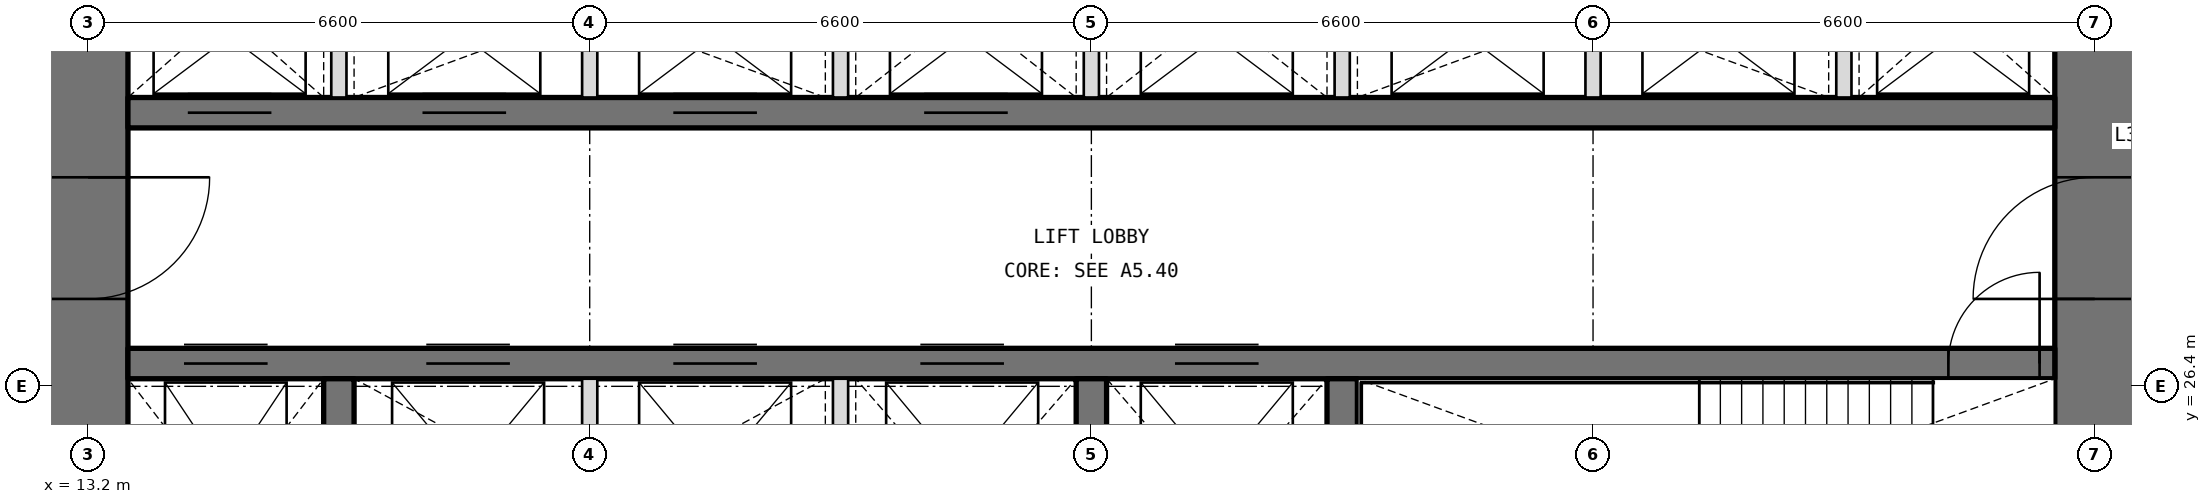
"""IFC4 building model, lengths in metres.
Left out: names, types, materials, properties, quantities, classifications, styles, units other than length and angle.
Written with IfcOpenShell. Run it as: python <this file> out.ifc"""

import sys

from ifc_helpers import new_model, si_unit, direction, frame, frame_2d, origin, place, context, subcontext, project, spatial, rectangle, extrude, element, fill, save


model = new_model("IFC4")
c1 = context("Model", 3, precision=1e-05, world=origin(), true_north=direction((0.0, 1.0)))
c2 = subcontext(c1, "Body", "Model", "MODEL_VIEW")
j1 = project(units=[si_unit("LENGTHUNIT", "METRE"), si_unit("PLANEANGLEUNIT", "RADIAN")], contexts=[c1])
p1 = place(None, origin())
s1 = spatial("IfcSite", under=j1, at=p1, CompositionType="ELEMENT")
p2 = place(p1, origin())
s2 = spatial("IfcBuilding", under=s1, at=p2, CompositionType="ELEMENT")
p3 = place(p2, frame((0.0, 0.0, 168.3)))
s3 = spatial("IfcBuildingStorey", under=s2, at=p3, CompositionType="ELEMENT", Elevation=168.3)
p4 = place(p3, frame((39.6, 13.725, 0.0), z_axis=(0.0, 0.0, 1.0), x_axis=(0.0, 1.0, 0.0)))
e1 = element("IfcWall", 1, at=p4, inside=s3, PredefinedType="SHEAR", context=c2, shape_type="SweptSolid", body=[
    extrude(rectangle(XDim=18.75, YDim=1.05, at=frame_2d((9.375, 0.0))), origin(), (0.0, 0.0, 1.0), 4.2),
])
p5 = place(p4, frame((3.025, 0.0, 0.0)))
e2 = element("IfcOpeningElement", 2, at=p5, cuts=e1, PredefinedType="OPENING", context=c2, shape_type="SweptSolid", body=[
    extrude(rectangle(XDim=1.6, YDim=2.1, at=frame_2d((0.8, 1.05))), frame((0.0, 0.535, 0.0), z_axis=(0.0, -1.0, 0.0), x_axis=(1.0, 0.0, 0.0)), (0.0, 0.0, 1.0), 1.07),
])
p6 = place(p4, frame((13.825, 0.0, 0.0)))
e3 = element("IfcOpeningElement", 3, at=p6, cuts=e1, PredefinedType="OPENING", context=c2, shape_type="SweptSolid", body=[
    extrude(rectangle(XDim=1.6, YDim=2.1, at=frame_2d((0.8, 1.05))), frame((0.0, 0.535, 0.0), z_axis=(0.0, -1.0, 0.0), x_axis=(1.0, 0.0, 0.0)), (0.0, 0.0, 1.0), 1.07),
])
p7 = place(p3, frame((13.2, 32.475, 0.0), z_axis=(0.0, 0.0, 1.0), x_axis=(0.0, -1.0, 0.0)))
e4 = element("IfcWall", 4, at=p7, inside=s3, PredefinedType="SHEAR", context=c2, shape_type="SweptSolid", body=[
    extrude(rectangle(XDim=18.75, YDim=1.05, at=frame_2d((9.375, 0.0))), origin(), (0.0, 0.0, 1.0), 4.2),
])
p8 = place(p7, frame((14.125, 0.0, 0.0)))
e5 = element("IfcOpeningElement", 5, at=p8, cuts=e4, PredefinedType="OPENING", context=c2, shape_type="SweptSolid", body=[
    extrude(rectangle(XDim=1.6, YDim=2.1, at=frame_2d((0.8, 1.05))), frame((0.0, 0.535, 0.0), z_axis=(0.0, -1.0, 0.0), x_axis=(1.0, 0.0, 0.0)), (0.0, 0.0, 1.0), 1.07),
])
p9 = place(p7, frame((3.325, 0.0, 0.0)))
e6 = element("IfcOpeningElement", 6, at=p9, cuts=e4, PredefinedType="OPENING", context=c2, shape_type="SweptSolid", body=[
    extrude(rectangle(XDim=1.6, YDim=2.1, at=frame_2d((0.8, 1.05))), frame((0.0, 0.535, 0.0), z_axis=(0.0, -1.0, 0.0), x_axis=(1.0, 0.0, 0.0)), (0.0, 0.0, 1.0), 1.07),
])
p10 = place(p3, frame((13.725, 26.7, 0.0), z_axis=(0.0, 0.0, 1.0), x_axis=(1.0, 0.0, 0.0)))
e7 = element("IfcWall", 7, at=p10, inside=s3, PredefinedType="SHEAR", context=c2, shape_type="SweptSolid", body=[
    extrude(rectangle(XDim=25.35, YDim=0.4, at=frame_2d((12.675, 0.0))), origin(), (0.0, 0.0, 1.0), 4.2),
])
p11 = place(p10, frame((23.95, 0.0, 0.0)))
e8 = element("IfcOpeningElement", 8, at=p11, cuts=e7, PredefinedType="OPENING", context=c2, shape_type="SweptSolid", body=[
    extrude(rectangle(XDim=1.2, YDim=2.1, at=frame_2d((0.6, 1.05))), frame((0.0, 0.21, 0.0), z_axis=(0.0, -1.0, 0.0), x_axis=(1.0, 0.0, 0.0)), (0.0, 0.0, 1.0), 0.42),
])
p12 = place(p10, frame((0.738, 0.0, 0.0)))
e9 = element("IfcOpeningElement", 9, at=p12, cuts=e7, PredefinedType="OPENING", context=c2, shape_type="SweptSolid", body=[
    extrude(rectangle(XDim=1.1, YDim=2.1, at=frame_2d((0.55, 1.05))), frame((0.0, 0.21, 0.0), z_axis=(0.0, -1.0, 0.0), x_axis=(1.0, 0.0, 0.0)), (0.0, 0.0, 1.0), 0.42),
])
p13 = place(p10, frame((3.925, 0.0, 0.0)))
e10 = element("IfcOpeningElement", 10, at=p13, cuts=e7, PredefinedType="OPENING", context=c2, shape_type="SweptSolid", body=[
    extrude(rectangle(XDim=1.1, YDim=2.1, at=frame_2d((0.55, 1.05))), frame((0.0, 0.21, 0.0), z_axis=(0.0, -1.0, 0.0), x_axis=(1.0, 0.0, 0.0)), (0.0, 0.0, 1.0), 0.42),
])
p14 = place(p10, frame((7.175, 0.0, 0.0)))
e11 = element("IfcOpeningElement", 11, at=p14, cuts=e7, PredefinedType="OPENING", context=c2, shape_type="SweptSolid", body=[
    extrude(rectangle(XDim=1.1, YDim=2.1, at=frame_2d((0.55, 1.05))), frame((0.0, 0.21, 0.0), z_axis=(0.0, -1.0, 0.0), x_axis=(1.0, 0.0, 0.0)), (0.0, 0.0, 1.0), 0.42),
])
p15 = place(p10, frame((10.425, 0.0, 0.0)))
e12 = element("IfcOpeningElement", 12, at=p15, cuts=e7, PredefinedType="OPENING", context=c2, shape_type="SweptSolid", body=[
    extrude(rectangle(XDim=1.1, YDim=2.1, at=frame_2d((0.55, 1.05))), frame((0.0, 0.21, 0.0), z_axis=(0.0, -1.0, 0.0), x_axis=(1.0, 0.0, 0.0)), (0.0, 0.0, 1.0), 0.42),
])
p16 = place(p10, frame((13.775, 0.0, 0.0)))
e13 = element("IfcOpeningElement", 13, at=p16, cuts=e7, PredefinedType="OPENING", context=c2, shape_type="SweptSolid", body=[
    extrude(rectangle(XDim=1.1, YDim=2.1, at=frame_2d((0.55, 1.05))), frame((0.0, 0.21, 0.0), z_axis=(0.0, -1.0, 0.0), x_axis=(1.0, 0.0, 0.0)), (0.0, 0.0, 1.0), 0.42),
])
p17 = place(p3, frame((13.725, 30.0, 0.0), z_axis=(0.0, 0.0, 1.0), x_axis=(1.0, 0.0, 0.0)))
e14 = element("IfcWall", 14, at=p17, inside=s3, PredefinedType="SHEAR", context=c2, shape_type="SweptSolid", body=[
    extrude(rectangle(XDim=25.35, YDim=0.4, at=frame_2d((12.675, 0.0))), origin(), (0.0, 0.0, 1.0), 4.2),
])
p18 = place(p17, frame((0.788, 0.0, 0.0)))
e15 = element("IfcOpeningElement", 15, at=p18, cuts=e14, PredefinedType="OPENING", context=c2, shape_type="SweptSolid", body=[
    extrude(rectangle(XDim=1.1, YDim=2.1, at=frame_2d((0.55, 1.05))), frame((0.0, 0.21, 0.0), z_axis=(0.0, -1.0, 0.0), x_axis=(1.0, 0.0, 0.0)), (0.0, 0.0, 1.0), 0.42),
])
p19 = place(p17, frame((3.875, 0.0, 0.0)))
e16 = element("IfcOpeningElement", 16, at=p19, cuts=e14, PredefinedType="OPENING", context=c2, shape_type="SweptSolid", body=[
    extrude(rectangle(XDim=1.1, YDim=2.1, at=frame_2d((0.55, 1.05))), frame((0.0, 0.21, 0.0), z_axis=(0.0, -1.0, 0.0), x_axis=(1.0, 0.0, 0.0)), (0.0, 0.0, 1.0), 0.42),
])
p20 = place(p17, frame((7.175, 0.0, 0.0)))
e17 = element("IfcOpeningElement", 17, at=p20, cuts=e14, PredefinedType="OPENING", context=c2, shape_type="SweptSolid", body=[
    extrude(rectangle(XDim=1.1, YDim=2.1, at=frame_2d((0.55, 1.05))), frame((0.0, 0.21, 0.0), z_axis=(0.0, -1.0, 0.0), x_axis=(1.0, 0.0, 0.0)), (0.0, 0.0, 1.0), 0.42),
])
p21 = place(p17, frame((10.475, 0.0, 0.0)))
e18 = element("IfcOpeningElement", 18, at=p21, cuts=e14, PredefinedType="OPENING", context=c2, shape_type="SweptSolid", body=[
    extrude(rectangle(XDim=1.1, YDim=2.1, at=frame_2d((0.55, 1.05))), frame((0.0, 0.21, 0.0), z_axis=(0.0, -1.0, 0.0), x_axis=(1.0, 0.0, 0.0)), (0.0, 0.0, 1.0), 0.42),
])
for number, where, z_axis, x_axis in (
    (19, (16.5, 23.15, 0.0), (0.0, 0.0, 1.0), (0.0, 1.0, 0.0)),
    (20, (26.4, 23.15, 0.0), (0.0, 0.0, 1.0), (0.0, 1.0, 0.0)),
    (21, (29.7, 23.15, 0.0), (0.0, 0.0, 1.0), (0.0, 1.0, 0.0)),
):
    element("IfcWall", number, at=place(p3, frame(where, z_axis=z_axis, x_axis=x_axis)), inside=s3, PredefinedType="SHEAR", context=c2, shape_type="SweptSolid", body=[
        extrude(rectangle(XDim=3.35, YDim=0.4, at=frame_2d((1.675, 0.0))), origin(), (0.0, 0.0, 1.0), 4.2),
    ])
for number, where, z_axis, x_axis in (
    (22, (16.5, 30.2, 0.0), (0.0, 0.0, 1.0), (0.0, 1.0, 0.0)),
    (23, (19.8, 30.2, 0.0), (0.0, 0.0, 1.0), (0.0, 1.0, 0.0)),
    (24, (23.1, 30.2, 0.0), (0.0, 0.0, 1.0), (0.0, 1.0, 0.0)),
    (25, (26.4, 30.2, 0.0), (0.0, 0.0, 1.0), (0.0, 1.0, 0.0)),
    (26, (29.7, 30.2, 0.0), (0.0, 0.0, 1.0), (0.0, 1.0, 0.0)),
    (27, (33.0, 30.2, 0.0), (0.0, 0.0, 1.0), (0.0, 1.0, 0.0)),
    (28, (36.3, 30.2, 0.0), (0.0, 0.0, 1.0), (0.0, 1.0, 0.0)),
):
    element("IfcWall", number, at=place(p3, frame(where, z_axis=z_axis, x_axis=x_axis)), inside=s3, PredefinedType="PARTITIONING", context=c2, shape_type="SweptSolid", body=[
        extrude(rectangle(XDim=2.275, YDim=0.2, at=frame_2d((1.138, 0.0))), origin(), (0.0, 0.0, 1.0), 4.2),
    ])
for number, where, z_axis, x_axis in (
    (29, (19.8, 23.15, 0.0), (0.0, 0.0, 1.0), (0.0, 1.0, 0.0)),
    (30, (23.1, 23.15, 0.0), (0.0, 0.0, 1.0), (0.0, 1.0, 0.0)),
):
    element("IfcWall", number, at=place(p3, frame(where, z_axis=z_axis, x_axis=x_axis)), inside=s3, PredefinedType="PARTITIONING", context=c2, shape_type="SweptSolid", body=[
        extrude(rectangle(XDim=3.35, YDim=0.2, at=frame_2d((1.675, 0.0))), origin(), (0.0, 0.0, 1.0), 4.2),
    ])
p22 = place(p11, origin())
e31 = element("IfcDoor", 31, at=p22, inside=s3, OperationType="SINGLE_SWING_RIGHT", PredefinedType="DOOR", context=c2, shape_type="SweptSolid", body=[
    extrude(rectangle(XDim=1.2, YDim=2.1, at=frame_2d((0.6, 1.05))), frame((0.0, 0.025, 0.0), z_axis=(0.0, -1.0, 0.0), x_axis=(1.0, 0.0, 0.0)), (0.0, 0.0, 1.0), 0.05),
])
fill(e8, e31)
p23 = place(p9, origin())
e32 = element("IfcDoor", 32, at=p23, inside=s3, OperationType="DOUBLE_DOOR_DOUBLE_SWING", PredefinedType="DOOR", context=c2, shape_type="SweptSolid", body=[
    extrude(rectangle(XDim=1.6, YDim=2.1, at=frame_2d((0.8, 1.05))), frame((0.0, 0.025, 0.0), z_axis=(0.0, -1.0, 0.0), x_axis=(1.0, 0.0, 0.0)), (0.0, 0.0, 1.0), 0.05),
])
fill(e6, e32)
p24 = place(p6, origin())
e33 = element("IfcDoor", 33, at=p24, inside=s3, OperationType="DOUBLE_DOOR_DOUBLE_SWING", PredefinedType="DOOR", context=c2, shape_type="SweptSolid", body=[
    extrude(rectangle(XDim=1.6, YDim=2.1, at=frame_2d((0.8, 1.05))), frame((0.0, 0.025, 0.0), z_axis=(0.0, -1.0, 0.0), x_axis=(1.0, 0.0, 0.0)), (0.0, 0.0, 1.0), 0.05),
])
fill(e3, e33)
p25 = place(p18, origin())
e34 = element("IfcDoor", 34, at=p25, inside=s3, OperationType="DOUBLE_DOOR_SLIDING", PredefinedType="DOOR", context=c2, shape_type="SweptSolid", body=[
    extrude(rectangle(XDim=1.1, YDim=2.1, at=frame_2d((0.55, 1.05))), frame((0.0, 0.025, 0.0), z_axis=(0.0, -1.0, 0.0), x_axis=(1.0, 0.0, 0.0)), (0.0, 0.0, 1.0), 0.05),
])
fill(e15, e34)
p26 = place(p19, origin())
e35 = element("IfcDoor", 35, at=p26, inside=s3, OperationType="DOUBLE_DOOR_SLIDING", PredefinedType="DOOR", context=c2, shape_type="SweptSolid", body=[
    extrude(rectangle(XDim=1.1, YDim=2.1, at=frame_2d((0.55, 1.05))), frame((0.0, 0.025, 0.0), z_axis=(0.0, -1.0, 0.0), x_axis=(1.0, 0.0, 0.0)), (0.0, 0.0, 1.0), 0.05),
])
fill(e16, e35)
p27 = place(p20, origin())
e36 = element("IfcDoor", 36, at=p27, inside=s3, OperationType="DOUBLE_DOOR_SLIDING", PredefinedType="DOOR", context=c2, shape_type="SweptSolid", body=[
    extrude(rectangle(XDim=1.1, YDim=2.1, at=frame_2d((0.55, 1.05))), frame((0.0, 0.025, 0.0), z_axis=(0.0, -1.0, 0.0), x_axis=(1.0, 0.0, 0.0)), (0.0, 0.0, 1.0), 0.05),
])
fill(e17, e36)
p28 = place(p21, origin())
e37 = element("IfcDoor", 37, at=p28, inside=s3, OperationType="DOUBLE_DOOR_SLIDING", PredefinedType="DOOR", context=c2, shape_type="SweptSolid", body=[
    extrude(rectangle(XDim=1.1, YDim=2.1, at=frame_2d((0.55, 1.05))), frame((0.0, 0.025, 0.0), z_axis=(0.0, -1.0, 0.0), x_axis=(1.0, 0.0, 0.0)), (0.0, 0.0, 1.0), 0.05),
])
fill(e18, e37)
p29 = place(p12, origin())
e38 = element("IfcDoor", 38, at=p29, inside=s3, OperationType="DOUBLE_DOOR_SLIDING", PredefinedType="DOOR", context=c2, shape_type="SweptSolid", body=[
    extrude(rectangle(XDim=1.1, YDim=2.1, at=frame_2d((0.55, 1.05))), frame((0.0, 0.025, 0.0), z_axis=(0.0, -1.0, 0.0), x_axis=(1.0, 0.0, 0.0)), (0.0, 0.0, 1.0), 0.05),
])
fill(e9, e38)
p30 = place(p13, origin())
e39 = element("IfcDoor", 39, at=p30, inside=s3, OperationType="DOUBLE_DOOR_SLIDING", PredefinedType="DOOR", context=c2, shape_type="SweptSolid", body=[
    extrude(rectangle(XDim=1.1, YDim=2.1, at=frame_2d((0.55, 1.05))), frame((0.0, 0.025, 0.0), z_axis=(0.0, -1.0, 0.0), x_axis=(1.0, 0.0, 0.0)), (0.0, 0.0, 1.0), 0.05),
])
fill(e10, e39)
p31 = place(p14, origin())
e40 = element("IfcDoor", 40, at=p31, inside=s3, OperationType="DOUBLE_DOOR_SLIDING", PredefinedType="DOOR", context=c2, shape_type="SweptSolid", body=[
    extrude(rectangle(XDim=1.1, YDim=2.1, at=frame_2d((0.55, 1.05))), frame((0.0, 0.025, 0.0), z_axis=(0.0, -1.0, 0.0), x_axis=(1.0, 0.0, 0.0)), (0.0, 0.0, 1.0), 0.05),
])
fill(e11, e40)
p32 = place(p15, origin())
e41 = element("IfcDoor", 41, at=p32, inside=s3, OperationType="DOUBLE_DOOR_SLIDING", PredefinedType="DOOR", context=c2, shape_type="SweptSolid", body=[
    extrude(rectangle(XDim=1.1, YDim=2.1, at=frame_2d((0.55, 1.05))), frame((0.0, 0.025, 0.0), z_axis=(0.0, -1.0, 0.0), x_axis=(1.0, 0.0, 0.0)), (0.0, 0.0, 1.0), 0.05),
])
fill(e12, e41)
p33 = place(p16, origin())
e42 = element("IfcDoor", 42, at=p33, inside=s3, OperationType="DOUBLE_DOOR_SLIDING", PredefinedType="DOOR", context=c2, shape_type="SweptSolid", body=[
    extrude(rectangle(XDim=1.1, YDim=2.1, at=frame_2d((0.55, 1.05))), frame((0.0, 0.025, 0.0), z_axis=(0.0, -1.0, 0.0), x_axis=(1.0, 0.0, 0.0)), (0.0, 0.0, 1.0), 0.05),
])
fill(e13, e42)
save(model, sys.argv[1])
